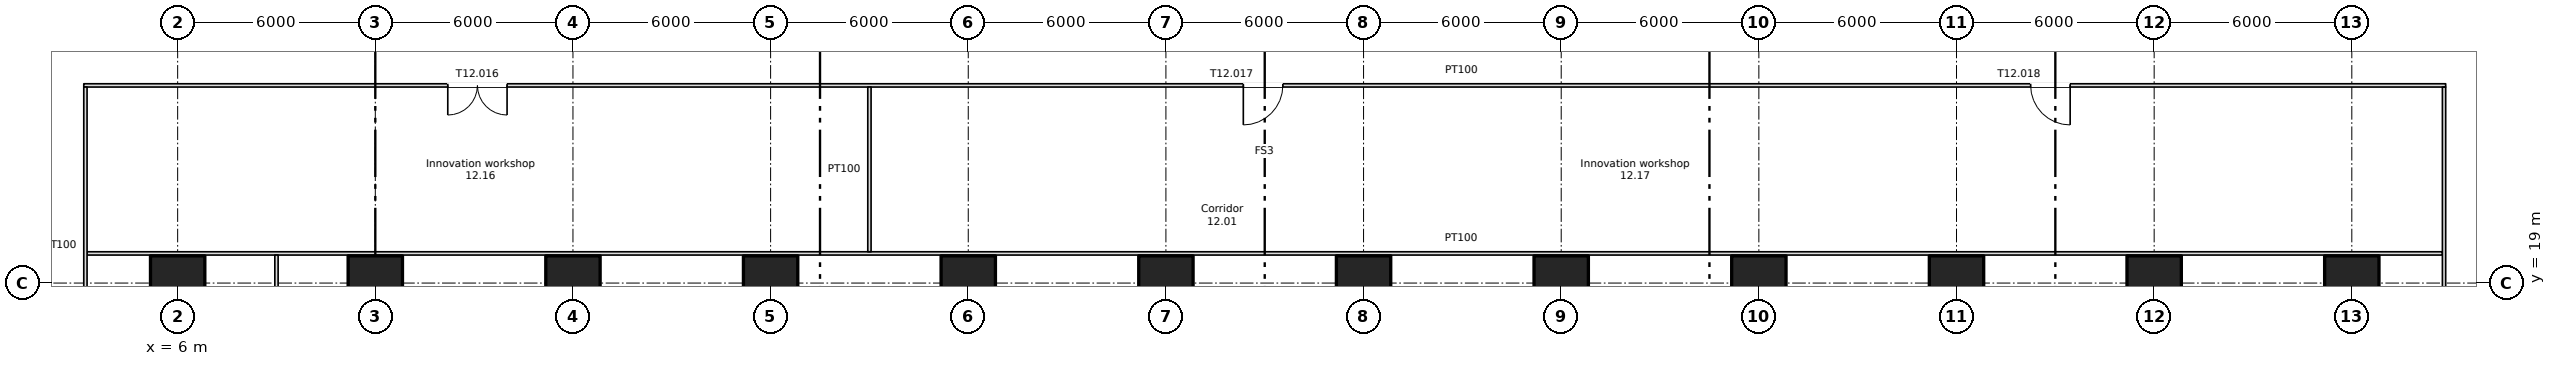
"""IFC4 building model, lengths in metres.
Left out: names, types, materials, properties, quantities, classifications, styles, units other than length and angle.
Written with IfcOpenShell. Run it as: python <this file> out.ifc"""

import sys

from ifc_helpers import new_model, si_unit, direction, frame, frame_2d, origin, origin_2d, place, context, subcontext, project, spatial, rectangle, extrude, element, fill, save


model = new_model("IFC4")
c1 = context("Model", 3, precision=1e-05, world=origin(), true_north=direction((0.0, 1.0)))
c2 = subcontext(c1, "Body", "Model", "MODEL_VIEW")
j1 = project(units=[si_unit("LENGTHUNIT", "METRE"), si_unit("PLANEANGLEUNIT", "RADIAN")], contexts=[c1])
p1 = place(None, origin())
s1 = spatial("IfcSite", under=j1, at=p1, CompositionType="ELEMENT")
p2 = place(p1, origin())
s2 = spatial("IfcBuilding", under=s1, at=p2, CompositionType="ELEMENT")
p3 = place(p2, frame((0.0, 0.0, 60.0)))
s3 = spatial("IfcBuildingStorey", under=s2, at=p3, CompositionType="ELEMENT", Elevation=60.0)
for number, where, z_axis, x_axis in (
    (1, (6.0, 19.0, 0.0), (0.0, 0.0, 1.0), (1.0, 0.0, 0.0)),
    (2, (12.0, 19.0, 0.0), (0.0, 0.0, 1.0), (1.0, 0.0, 0.0)),
    (3, (18.0, 19.0, 0.0), (0.0, 0.0, 1.0), (1.0, 0.0, 0.0)),
    (4, (24.0, 19.0, 0.0), (0.0, 0.0, 1.0), (1.0, 0.0, 0.0)),
    (5, (30.0, 19.0, 0.0), (0.0, 0.0, 1.0), (1.0, 0.0, 0.0)),
    (6, (36.0, 19.0, 0.0), (0.0, 0.0, 1.0), (1.0, 0.0, 0.0)),
    (7, (42.0, 19.0, 0.0), (0.0, 0.0, 1.0), (1.0, 0.0, 0.0)),
    (8, (48.0, 19.0, 0.0), (0.0, 0.0, 1.0), (1.0, 0.0, 0.0)),
    (9, (54.0, 19.0, 0.0), (0.0, 0.0, 1.0), (1.0, 0.0, 0.0)),
    (10, (60.0, 19.0, 0.0), (0.0, 0.0, 1.0), (1.0, 0.0, 0.0)),
    (11, (66.0, 19.0, 0.0), (0.0, 0.0, 1.0), (1.0, 0.0, 0.0)),
    (12, (72.0, 19.0, 0.0), (0.0, 0.0, 1.0), (1.0, 0.0, 0.0)),
):
    element("IfcColumn", number, at=place(p3, frame(where, z_axis=z_axis, x_axis=x_axis)), inside=s3, PredefinedType="COLUMN", context=c2, shape_type="SweptSolid", body=[
        extrude(rectangle(XDim=1.65, YDim=1.65, at=origin_2d()), origin(), (0.0, 0.0, 1.0), 3.35),
    ])
p4 = place(p3, frame((3.25, 19.9, 0.0), z_axis=(0.0, 0.0, 1.0), x_axis=(1.0, 0.0, 0.0)))
e13 = element("IfcWall", 13, at=p4, inside=s3, PredefinedType="PARTITIONING", context=c2, shape_type="SweptSolid", body=[
    extrude(rectangle(XDim=71.5, YDim=0.1, at=frame_2d((35.75, 0.0))), origin(), (0.0, 0.0, 1.0), 3.35),
])
p5 = place(p3, frame((3.15, 25.0, 0.0), z_axis=(0.0, 0.0, 1.0), x_axis=(1.0, 0.0, 0.0)))
e14 = element("IfcWall", 14, at=p5, inside=s3, PredefinedType="PARTITIONING", context=c2, shape_type="SweptSolid", body=[
    extrude(rectangle(XDim=71.7, YDim=0.1, at=frame_2d((35.85, 0.0))), origin(), (0.0, 0.0, 1.0), 3.35),
])
p6 = place(p5, frame((11.05, 0.0, 0.0)))
e15 = element("IfcOpeningElement", 15, at=p6, cuts=e14, PredefinedType="OPENING", context=c2, shape_type="SweptSolid", body=[
    extrude(rectangle(XDim=1.8, YDim=2.1, at=frame_2d((0.9, 1.05))), frame((0.0, 0.06, 0.0), z_axis=(0.0, -1.0, 0.0), x_axis=(1.0, 0.0, 0.0)), (0.0, 0.0, 1.0), 0.12),
])
p7 = place(p5, frame((35.2, 0.0, 0.0)))
e16 = element("IfcOpeningElement", 16, at=p7, cuts=e14, PredefinedType="OPENING", context=c2, shape_type="SweptSolid", body=[
    extrude(rectangle(XDim=1.2, YDim=2.1, at=frame_2d((0.6, 1.05))), frame((0.0, 0.06, 0.0), z_axis=(0.0, -1.0, 0.0), x_axis=(1.0, 0.0, 0.0)), (0.0, 0.0, 1.0), 0.12),
])
p8 = place(p5, frame((59.1, 0.0, 0.0)))
e17 = element("IfcOpeningElement", 17, at=p8, cuts=e14, PredefinedType="OPENING", context=c2, shape_type="SweptSolid", body=[
    extrude(rectangle(XDim=1.2, YDim=2.1, at=frame_2d((0.6, 1.05))), frame((0.0, 0.06, 0.0), z_axis=(0.0, -1.0, 0.0), x_axis=(1.0, 0.0, 0.0)), (0.0, 0.0, 1.0), 0.12),
])
p9 = place(p3, frame((3.2, 13.45, 0.0), z_axis=(0.0, 0.0, 1.0), x_axis=(0.0, 1.0, 0.0)))
e18 = element("IfcWall", 18, at=p9, inside=s3, PredefinedType="PARTITIONING", context=c2, shape_type="SweptSolid", body=[
    extrude(rectangle(XDim=11.5, YDim=0.1, at=frame_2d((5.75, 0.0))), origin(), (0.0, 0.0, 1.0), 3.35),
])
p10 = place(p9, frame((2.7, 0.0, 0.0)))
e19 = element("IfcOpeningElement", 19, at=p10, cuts=e18, PredefinedType="OPENING", context=c2, shape_type="SweptSolid", body=[
    extrude(rectangle(XDim=1.0, YDim=2.1, at=frame_2d((0.5, 1.05))), frame((0.0, 0.06, 0.0), z_axis=(0.0, -1.0, 0.0), x_axis=(1.0, 0.0, 0.0)), (0.0, 0.0, 1.0), 0.12),
])
p11 = place(p3, frame((9.0, 13.45, 0.0), z_axis=(0.0, 0.0, 1.0), x_axis=(0.0, 1.0, 0.0)))
e20 = element("IfcWall", 20, at=p11, inside=s3, PredefinedType="PARTITIONING", context=c2, shape_type="SweptSolid", body=[
    extrude(rectangle(XDim=6.4, YDim=0.1, at=frame_2d((3.2, 0.0))), origin(), (0.0, 0.0, 1.0), 3.35),
])
p12 = place(p3, frame((27.0, 19.95, 0.0), z_axis=(0.0, 0.0, 1.0), x_axis=(0.0, 1.0, 0.0)))
e21 = element("IfcWall", 21, at=p12, inside=s3, PredefinedType="PARTITIONING", context=c2, shape_type="SweptSolid", body=[
    extrude(rectangle(XDim=5.0, YDim=0.1, at=frame_2d((2.5, 0.0))), origin(), (0.0, 0.0, 1.0), 3.35),
])
p13 = place(p3, frame((74.8, 13.45, 0.0), z_axis=(0.0, 0.0, 1.0), x_axis=(0.0, 1.0, 0.0)))
e22 = element("IfcWall", 22, at=p13, inside=s3, PredefinedType="PARTITIONING", context=c2, shape_type="SweptSolid", body=[
    extrude(rectangle(XDim=11.5, YDim=0.1, at=frame_2d((5.75, 0.0))), origin(), (0.0, 0.0, 1.0), 3.35),
])
p14 = place(p6, origin())
e23 = element("IfcDoor", 23, at=p14, inside=s3, OperationType="DOUBLE_DOOR_SINGLE_SWING", PredefinedType="DOOR", context=c2, shape_type="SweptSolid", body=[
    extrude(rectangle(XDim=1.8, YDim=2.1, at=frame_2d((0.9, 1.05))), frame((0.0, 0.025, 0.0), z_axis=(0.0, -1.0, 0.0), x_axis=(1.0, 0.0, 0.0)), (0.0, 0.0, 1.0), 0.05),
])
fill(e15, e23)
p15 = place(p7, origin())
e24 = element("IfcDoor", 24, at=p15, inside=s3, OperationType="SINGLE_SWING_LEFT", PredefinedType="DOOR", context=c2, shape_type="SweptSolid", body=[
    extrude(rectangle(XDim=1.2, YDim=2.1, at=frame_2d((0.6, 1.05))), frame((0.0, 0.025, 0.0), z_axis=(0.0, -1.0, 0.0), x_axis=(1.0, 0.0, 0.0)), (0.0, 0.0, 1.0), 0.05),
])
fill(e16, e24)
p16 = place(p8, origin())
e25 = element("IfcDoor", 25, at=p16, inside=s3, OperationType="SINGLE_SWING_RIGHT", PredefinedType="DOOR", context=c2, shape_type="SweptSolid", body=[
    extrude(rectangle(XDim=1.2, YDim=2.1, at=frame_2d((0.6, 1.05))), frame((0.0, 0.025, 0.0), z_axis=(0.0, -1.0, 0.0), x_axis=(1.0, 0.0, 0.0)), (0.0, 0.0, 1.0), 0.05),
])
fill(e17, e25)
save(model, sys.argv[1])
